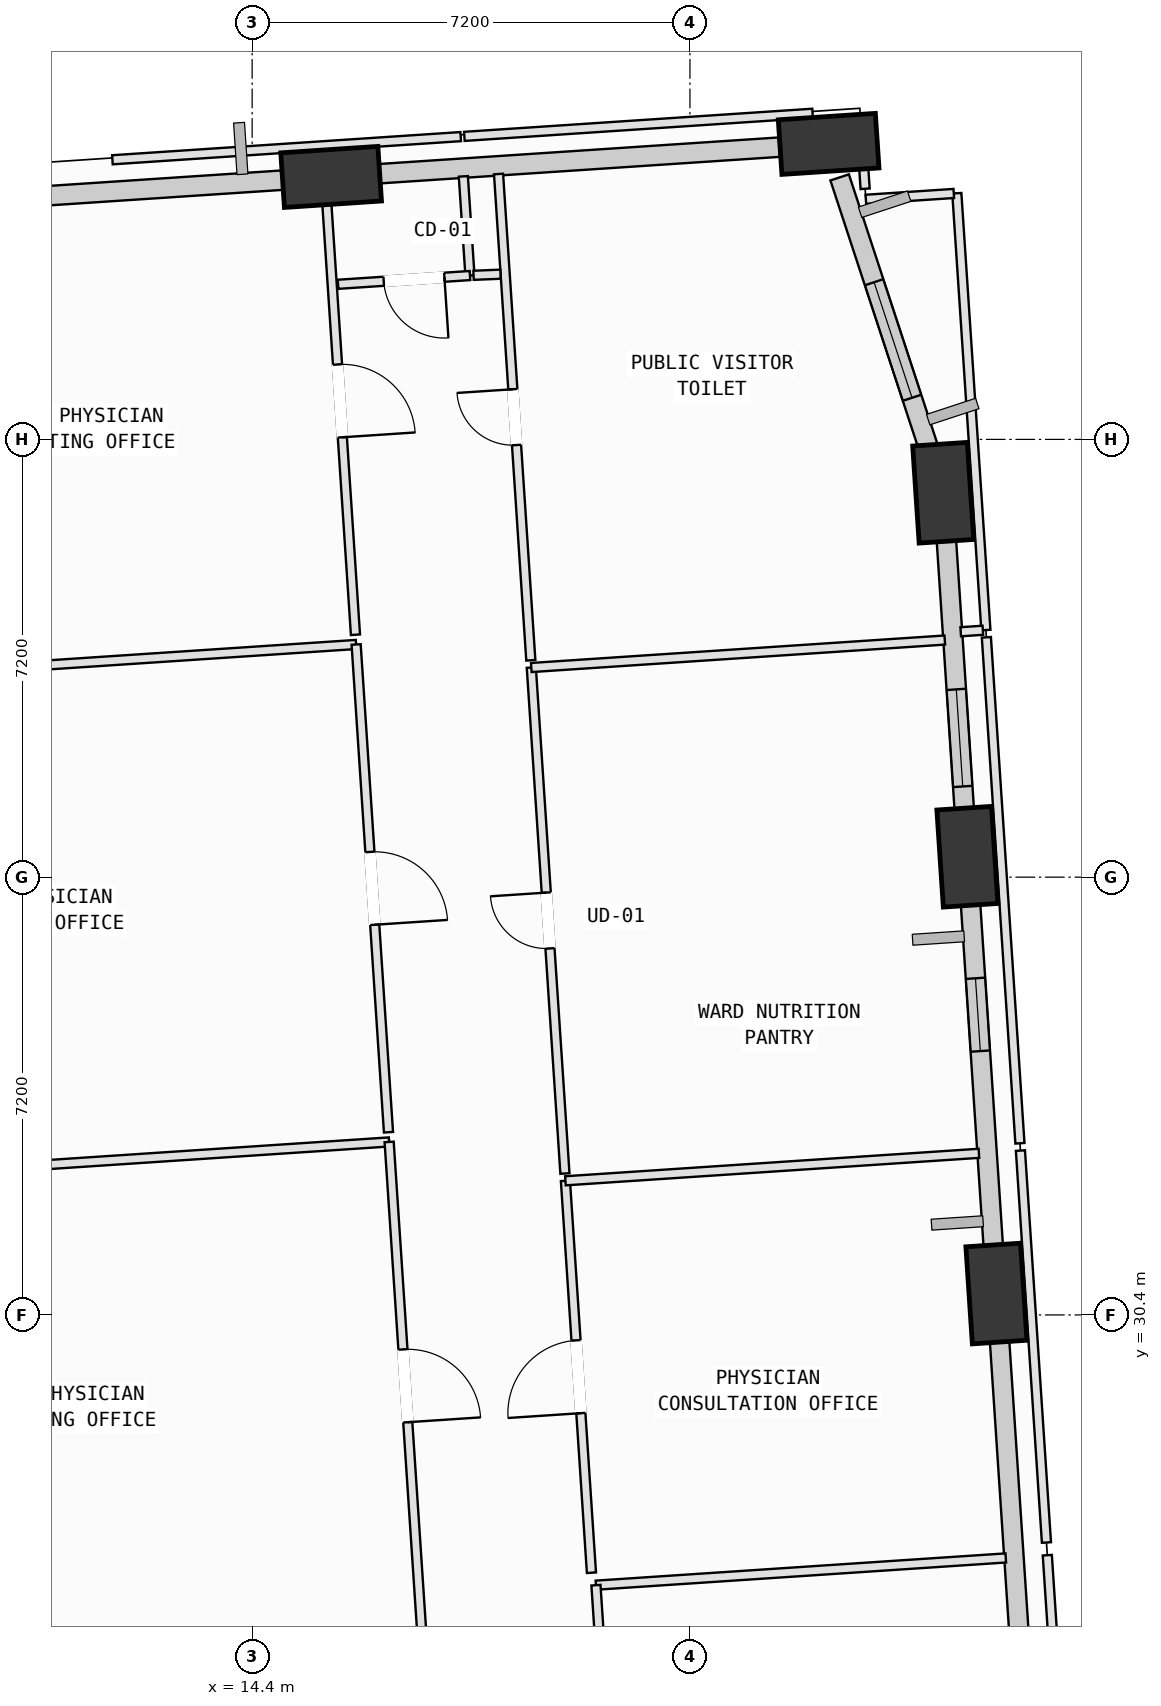
"""IFC4 building model, lengths in metres.
Left out: names, types, materials, properties, quantities, classifications, styles, units other than length and angle.
Written with IfcOpenShell. Run it as: python <this file> out.ifc"""

import sys

from ifc_helpers import new_model, si_unit, direction, frame, frame_2d, origin, origin_2d, place, context, subcontext, project, spatial, rectangle, extrude, element, fill, save


model = new_model("IFC4")
c1 = context("Model", 3, precision=1e-05, world=origin(), true_north=direction((0.0, 1.0)))
c2 = subcontext(c1, "Body", "Model", "MODEL_VIEW")
j1 = project(units=[si_unit("LENGTHUNIT", "METRE"), si_unit("PLANEANGLEUNIT", "RADIAN")], contexts=[c1])
p1 = place(None, origin())
s1 = spatial("IfcSite", under=j1, at=p1, CompositionType="ELEMENT")
p2 = place(p1, origin())
s2 = spatial("IfcBuilding", under=s1, at=p2, CompositionType="ELEMENT")
p3 = place(p2, frame((0.0, 0.0, 39.0)))
s3 = spatial("IfcBuildingStorey", under=s2, at=p3, CompositionType="ELEMENT", Elevation=39.0)
p4 = place(p3, frame((26.64, 30.752, 0.002), z_axis=(-0.024417379694, -0.028995638386, 0.999281263971), x_axis=(0.591563998635, 0.805370344302, 0.037823855406)))
e1 = element("IfcColumn", 1, at=p4, inside=s3, PredefinedType="COLUMN", context=c2, shape_type="SweptSolid", body=[
    extrude(rectangle(XDim=1.6, YDim=0.9, at=origin_2d()), origin(), (0.0, 0.0, 1.0), 4.0),
])
p5 = place(p3, frame((26.163, 37.936, 0.002), z_axis=(-0.054139539423, -0.031215590298, 0.998045338245), x_axis=(0.829617607898, 0.554838963776, 0.062356627078)))
e2 = element("IfcColumn", 2, at=p5, inside=s3, PredefinedType="COLUMN", context=c2, shape_type="SweptSolid", body=[
    extrude(rectangle(XDim=1.6, YDim=0.9, at=origin_2d()), origin(), (0.0, 0.0, 1.0), 4.004),
])
p6 = place(p3, frame((25.765, 43.923, 0.002), z_axis=(-0.078697694353, -0.033049379763, 0.996350546445), x_axis=(0.890951953445, 0.446039267367, 0.08516800232)))
e3 = element("IfcColumn", 3, at=p6, inside=s3, PredefinedType="COLUMN", context=c2, shape_type="SweptSolid", body=[
    extrude(rectangle(XDim=1.6, YDim=0.9, at=origin_2d()), origin(), (0.0, 0.0, 1.0), 4.011),
])
p7 = place(p3, frame((23.881, 49.66, 0.002), z_axis=(-0.102065358424, -0.040862573599, 0.993938082925), x_axis=(0.432012401952, -0.901838231222, 0.007286238123)))
e4 = element("IfcColumn", 4, at=p7, inside=s3, PredefinedType="COLUMN", context=c2, shape_type="SweptSolid", body=[
    extrude(rectangle(XDim=1.6, YDim=0.9, at=origin_2d()), origin(), (0.0, 0.0, 1.0), 4.021),
])
p8 = place(p3, frame((15.699, 49.117, 0.002), z_axis=(-0.099407727079, -0.074434566374, 0.992258836759), x_axis=(0.650696804167, -0.759293046403, 0.008230354175)))
e5 = element("IfcColumn", 5, at=p8, inside=s3, PredefinedType="COLUMN", context=c2, shape_type="SweptSolid", body=[
    extrude(rectangle(XDim=1.6, YDim=0.9, at=origin_2d()), origin(), (0.0, 0.0, 1.0), 4.028),
])
p9 = place(p3, frame((27.117, 23.571, 0.0), z_axis=(0.0, 0.0, 1.0), x_axis=(-0.066263654845, 0.997802148748, 0.0)))
e6 = element("IfcWall", 6, at=p9, inside=s3, PredefinedType="SOLIDWALL", context=c2, shape_type="SweptSolid", body=[
    extrude(rectangle(XDim=6.536, YDim=0.32, at=frame_2d((3.268, 0.0))), origin(), (0.0, 0.0, 1.0), 3.165),
])
p10 = place(p3, frame((26.604, 31.302, 0.0), z_axis=(0.0, 0.0, 1.0), x_axis=(-0.066281214276, 0.997800982478, 0.0)))
e7 = element("IfcWall", 7, at=p10, inside=s3, PredefinedType="SOLIDWALL", context=c2, shape_type="SweptSolid", body=[
    extrude(rectangle(XDim=5.997, YDim=0.32, at=frame_2d((2.998, 0.0))), origin(), (0.0, 0.0, 1.0), 3.165),
])
p11 = place(p10, frame((3.446, 0.0, 0.75)))
e8 = element("IfcOpeningElement", 8, at=p11, cuts=e7, PredefinedType="OPENING", context=c2, shape_type="SweptSolid", body=[
    extrude(rectangle(XDim=1.2, YDim=1.75, at=frame_2d((0.6, 0.875))), frame((0.0, 0.17, 0.0), z_axis=(0.0, -1.0, 0.0), x_axis=(1.0, 0.0, 0.0)), (0.0, 0.0, 1.0), 0.34),
])
p12 = place(p3, frame((26.127, 38.477, 0.0), z_axis=(0.0, 0.0, 1.0), x_axis=(-0.066303684838, 0.997799489565, 0.0)))
e9 = element("IfcWall", 9, at=p12, inside=s3, PredefinedType="SOLIDWALL", context=c2, shape_type="SweptSolid", body=[
    extrude(rectangle(XDim=4.816, YDim=0.32, at=frame_2d((2.408, 0.0))), origin(), (0.0, 0.0, 1.0), 3.165),
])
p13 = place(p12, frame((0.616, 0.0, 0.75)))
e10 = element("IfcOpeningElement", 10, at=p13, cuts=e9, PredefinedType="OPENING", context=c2, shape_type="SweptSolid", body=[
    extrude(rectangle(XDim=1.6, YDim=1.95, at=frame_2d((0.8, 0.975))), frame((0.0, 0.17, 0.0), z_axis=(0.0, -1.0, 0.0), x_axis=(1.0, 0.0, 0.0)), (0.0, 0.0, 1.0), 0.34),
])
p14 = place(p3, frame((24.062, 49.109, 0.0), z_axis=(0.0, 0.0, 1.0), x_axis=(0.312045120055, -0.950067283433, 0.0)))
e11 = element("IfcWall", 11, at=p14, inside=s3, PredefinedType="SOLIDWALL", context=c2, shape_type="SweptSolid", body=[
    extrude(rectangle(XDim=4.889, YDim=0.32, at=frame_2d((2.445, 0.0))), origin(), (0.0, 0.0, 1.0), 3.165),
])
p15 = place(p14, frame((1.815, 0.0, 0.75)))
e12 = element("IfcOpeningElement", 12, at=p15, cuts=e11, PredefinedType="OPENING", context=c2, shape_type="SweptSolid", body=[
    extrude(rectangle(XDim=2.0, YDim=1.95, at=frame_2d((1.0, 0.975))), frame((0.0, 0.17, 0.0), z_axis=(0.0, -1.0, 0.0), x_axis=(1.0, 0.0, 0.0)), (0.0, 0.0, 1.0), 0.34),
])
p16 = place(p3, frame((16.081, 49.142, 0.0), z_axis=(0.0, 0.0, 1.0), x_axis=(0.997799173188, 0.066308445806, 0.0)))
e13 = element("IfcWall", 13, at=p16, inside=s3, PredefinedType="SOLIDWALL", context=c2, shape_type="SweptSolid", body=[
    extrude(rectangle(XDim=7.003, YDim=0.32, at=frame_2d((3.501, 0.0))), origin(), (0.0, 0.0, 1.0), 3.165),
])
p17 = place(p3, frame((7.879, 48.598, 0.0), z_axis=(0.0, 0.0, 1.0), x_axis=(0.997800640447, 0.066286363022, 0.0)))
e14 = element("IfcWall", 14, at=p17, inside=s3, PredefinedType="SOLIDWALL", context=c2, shape_type="SweptSolid", body=[
    extrude(rectangle(XDim=7.035, YDim=0.32, at=frame_2d((3.517, 0.0))), origin(), (0.0, 0.0, 1.0), 3.165),
])
p18 = place(p3, frame((5.712, 32.519, 0.0), z_axis=(0.0, 0.0, 1.0), x_axis=(0.997805307983, 0.066216065736, 0.0)))
e15 = element("IfcWall", 15, at=p18, inside=s3, PredefinedType="PARTITIONING", context=c2, shape_type="SweptSolid", body=[
    extrude(rectangle(XDim=10.965, YDim=0.15, at=frame_2d((5.483, 0.0))), origin(), (0.0, 0.0, 1.0), 3.365),
])
p19 = place(p3, frame((16.653, 33.245, 0.0), z_axis=(0.0, 0.0, 1.0), x_axis=(0.066289247384, -0.997800448828, 0.0)))
e16 = element("IfcWall", 16, at=p19, inside=s3, PredefinedType="PARTITIONING", context=c2, shape_type="SweptSolid", body=[
    extrude(rectangle(XDim=8.04, YDim=0.15, at=frame_2d((4.02, 0.0))), origin(), (0.0, 0.0, 1.0), 3.78),
])
p20 = place(p19, frame((3.42, 0.0, 0.0)))
e17 = element("IfcOpeningElement", 17, at=p20, cuts=e16, PredefinedType="OPENING", context=c2, shape_type="SweptSolid", body=[
    extrude(rectangle(XDim=1.2, YDim=2.15, at=frame_2d((0.6, 1.075))), frame((0.0, 0.085, 0.0), z_axis=(0.0, -1.0, 0.0), x_axis=(1.0, 0.0, 0.0)), (0.0, 0.0, 1.0), 0.17),
])
p21 = place(p3, frame((5.169, 40.701, 0.0), z_axis=(0.0, 0.0, 1.0), x_axis=(0.997805307983, 0.066216065736, 0.0)))
e18 = element("IfcWall", 18, at=p21, inside=s3, PredefinedType="PARTITIONING", context=c2, shape_type="SweptSolid", body=[
    extrude(rectangle(XDim=10.965, YDim=0.15, at=frame_2d((5.483, 0.0))), origin(), (0.0, 0.0, 1.0), 3.78),
])
p22 = place(p3, frame((16.11, 41.427, 0.0), z_axis=(0.0, 0.0, 1.0), x_axis=(0.066170320126, -0.997808342686, 0.0)))
e19 = element("IfcWall", 19, at=p22, inside=s3, PredefinedType="PARTITIONING", context=c2, shape_type="SweptSolid", body=[
    extrude(rectangle(XDim=8.04, YDim=0.15, at=frame_2d((4.02, 0.0))), origin(), (0.0, 0.0, 1.0), 3.78),
])
p23 = place(p22, frame((3.42, 0.0, 0.0)))
e20 = element("IfcOpeningElement", 20, at=p23, cuts=e19, PredefinedType="OPENING", context=c2, shape_type="SweptSolid", body=[
    extrude(rectangle(XDim=1.2, YDim=2.15, at=frame_2d((0.6, 1.075))), frame((0.0, 0.085, 0.0), z_axis=(0.0, -1.0, 0.0), x_axis=(1.0, 0.0, 0.0)), (0.0, 0.0, 1.0), 0.17),
])
p24 = place(p3, frame((14.887, 49.233, 0.0), z_axis=(0.0, 0.0, 1.0), x_axis=(0.997748098839, 0.067072582054, 0.0)))
e21 = element("IfcWall", 21, at=p24, inside=s3, PredefinedType="PARTITIONING", context=c2, shape_type="SweptSolid", body=[
    extrude(rectangle(XDim=0.702, YDim=0.15, at=frame_2d((0.351, 0.0))), origin(), (0.0, 0.0, 1.0), 3.78),
])
p25 = place(p3, frame((15.588, 49.28, 0.0), z_axis=(0.0, 0.0, 1.0), x_axis=(0.066306740692, -0.997799286499, 0.0)))
e22 = element("IfcWall", 22, at=p25, inside=s3, PredefinedType="PARTITIONING", context=c2, shape_type="SweptSolid", body=[
    extrude(rectangle(XDim=7.71, YDim=0.15, at=frame_2d((3.855, 0.0))), origin(), (0.0, 0.0, 1.0), 2.865),
])
p26 = place(p25, frame((3.255, 0.0, 0.0)))
e23 = element("IfcOpeningElement", 23, at=p26, cuts=e22, PredefinedType="OPENING", context=c2, shape_type="SweptSolid", body=[
    extrude(rectangle(XDim=1.2, YDim=2.15, at=frame_2d((0.6, 1.075))), frame((0.0, 0.085, 0.0), z_axis=(0.0, -1.0, 0.0), x_axis=(1.0, 0.0, 0.0)), (0.0, 0.0, 1.0), 0.17),
])
p27 = place(p3, frame((20.054, 25.955, 0.0), z_axis=(0.0, 0.0, 1.0), x_axis=(0.997798252278, 0.066322302059, 0.0)))
e24 = element("IfcWall", 24, at=p27, inside=s3, PredefinedType="PARTITIONING", context=c2, shape_type="SweptSolid", body=[
    extrude(rectangle(XDim=6.755, YDim=0.15, at=frame_2d((3.377, 0.0))), origin(), (0.0, 0.0, 1.0), 3.78),
])
p28 = place(p3, frame((27.477, 26.448, 0.0), z_axis=(0.0, 0.0, 1.0), x_axis=(0.066297290222, -0.997799914466, 0.0)))
e25 = element("IfcWall", 25, at=p28, inside=s3, PredefinedType="PARTITIONING", context=c2, shape_type="SweptSolid", body=[
    extrude(rectangle(XDim=2.85, YDim=0.15, at=frame_2d((1.425, 0.0))), origin(), (0.0, 0.0, 1.0), 3.78),
])
p29 = place(p3, frame((20.411, 20.58, 0.0), z_axis=(0.0, 0.0, 1.0), x_axis=(-0.066260313675, 0.997802370628, 0.0)))
e26 = element("IfcWall", 26, at=p29, inside=s3, PredefinedType="PARTITIONING", context=c2, shape_type="SweptSolid", body=[
    extrude(rectangle(XDim=5.387, YDim=0.15, at=frame_2d((2.693, 0.0))), origin(), (0.0, 0.0, 1.0), 3.78),
])
p30 = place(p3, frame((19.98, 26.16, 0.0), z_axis=(0.0, 0.0, 1.0), x_axis=(-0.066248114822, 0.997803180634, 0.0)))
e27 = element("IfcWall", 27, at=p30, inside=s3, PredefinedType="PARTITIONING", context=c2, shape_type="SweptSolid", body=[
    extrude(rectangle(XDim=6.46, YDim=0.15, at=frame_2d((3.23, 0.0))), origin(), (0.0, 0.0, 1.0), 3.78),
])
p31 = place(p30, frame((2.63, 0.0, 0.0)))
e28 = element("IfcOpeningElement", 28, at=p31, cuts=e27, PredefinedType="OPENING", context=c2, shape_type="SweptSolid", body=[
    extrude(rectangle(XDim=1.2, YDim=2.15, at=frame_2d((0.6, 1.075))), frame((0.0, 0.085, 0.0), z_axis=(0.0, -1.0, 0.0), x_axis=(1.0, 0.0, 0.0)), (0.0, 0.0, 1.0), 0.17),
])
p32 = place(p3, frame((19.552, 32.606, 0.0), z_axis=(0.0, 0.0, 1.0), x_axis=(0.997796714123, 0.066345439075, 0.0)))
e29 = element("IfcWall", 29, at=p32, inside=s3, PredefinedType="PARTITIONING", context=c2, shape_type="SweptSolid", body=[
    extrude(rectangle(XDim=6.815, YDim=0.15, at=frame_2d((3.408, 0.0))), origin(), (0.0, 0.0, 1.0), 3.365),
])
p33 = place(p3, frame((27.035, 33.103, 0.0), z_axis=(0.0, 0.0, 1.0), x_axis=(0.066248114822, -0.997803180634, 0.0)))
e30 = element("IfcWall", 30, at=p33, inside=s3, PredefinedType="PARTITIONING", context=c2, shape_type="SweptSolid", body=[
    extrude(rectangle(XDim=6.46, YDim=0.15, at=frame_2d((3.23, 0.0))), origin(), (0.0, 0.0, 1.0), 3.78),
])
p34 = place(p3, frame((19.544, 32.726, 0.0), z_axis=(0.0, 0.0, 1.0), x_axis=(-0.066301410689, 0.99779964068, 0.0)))
e31 = element("IfcWall", 31, at=p34, inside=s3, PredefinedType="PARTITIONING", context=c2, shape_type="SweptSolid", body=[
    extrude(rectangle(XDim=8.34, YDim=0.15, at=frame_2d((4.17, 0.0))), origin(), (0.0, 0.0, 1.0), 3.78),
])
p35 = place(p34, frame((3.71, 0.0, 0.0)))
e32 = element("IfcOpeningElement", 32, at=p35, cuts=e31, PredefinedType="OPENING", context=c2, shape_type="SweptSolid", body=[
    extrude(rectangle(XDim=0.92, YDim=2.1, at=frame_2d((0.46, 1.05))), frame((0.0, 0.085, 0.0), z_axis=(0.0, -1.0, 0.0), x_axis=(1.0, 0.0, 0.0)), (0.0, 0.0, 1.0), 0.17),
])
p36 = place(p3, frame((18.991, 41.048, 0.0), z_axis=(0.0, 0.0, 1.0), x_axis=(0.997799084991, 0.066309772962, 0.0)))
e33 = element("IfcWall", 33, at=p36, inside=s3, PredefinedType="PARTITIONING", context=c2, shape_type="SweptSolid", body=[
    extrude(rectangle(XDim=6.815, YDim=0.15, at=frame_2d((3.407, 0.0))), origin(), (0.0, 0.0, 1.0), 3.78),
])
p37 = place(p3, frame((26.475, 41.545, 0.0), z_axis=(0.0, 0.0, 1.0), x_axis=(0.066184835455, -0.997807379987, 0.0)))
e34 = element("IfcWall", 34, at=p37, inside=s3, PredefinedType="PARTITIONING", context=c2, shape_type="SweptSolid", body=[
    extrude(rectangle(XDim=8.34, YDim=0.15, at=frame_2d((4.17, 0.0))), origin(), (0.0, 0.0, 1.0), 3.78),
])
p38 = place(p3, frame((25.989, 48.848, 0.0), z_axis=(0.0, 0.0, 1.0), x_axis=(0.066395224543, -0.997793402543, 0.0)))
e35 = element("IfcWall", 35, at=p38, inside=s3, PredefinedType="PARTITIONING", context=c2, shape_type="SweptSolid", body=[
    extrude(rectangle(XDim=7.2, YDim=0.15, at=frame_2d((3.6, 0.0))), origin(), (0.0, 0.0, 1.0), 3.78),
])
p39 = place(p3, frame((26.417, 41.661, 0.0), z_axis=(0.0, 0.0, 1.0), x_axis=(-0.99766818576, -0.068250942285, 0.0)))
e36 = element("IfcWall", 36, at=p39, inside=s3, PredefinedType="PARTITIONING", context=c2, shape_type="SweptSolid", body=[
    extrude(rectangle(XDim=0.365, YDim=0.15, at=frame_2d((0.182, 0.0))), origin(), (0.0, 0.0, 1.0), 3.78),
])
p40 = place(p3, frame((18.983, 41.167, 0.0), z_axis=(0.0, 0.0, 1.0), x_axis=(-0.066246099174, 0.997803314458, 0.0)))
e37 = element("IfcWall", 37, at=p40, inside=s3, PredefinedType="PARTITIONING", context=c2, shape_type="SweptSolid", body=[
    extrude(rectangle(XDim=8.016, YDim=0.15, at=frame_2d((4.008, 0.0))), origin(), (0.0, 0.0, 1.0), 3.78),
])
p41 = place(p40, frame((3.548, 0.0, 0.0)))
e38 = element("IfcOpeningElement", 38, at=p41, cuts=e37, PredefinedType="OPENING", context=c2, shape_type="SweptSolid", body=[
    extrude(rectangle(XDim=0.92, YDim=2.1, at=frame_2d((0.46, 1.05))), frame((0.0, 0.085, 0.0), z_axis=(0.0, -1.0, 0.0), x_axis=(1.0, 0.0, 0.0)), (0.0, 0.0, 1.0), 0.17),
])
p42 = place(p3, frame((23.056, 49.797, 0.0), z_axis=(0.0, 0.0, 1.0), x_axis=(0.997828501674, 0.065865630245, 0.0)))
e39 = element("IfcWall", 39, at=p42, inside=s3, PredefinedType="PARTITIONING", context=c2, shape_type="SweptSolid", body=[
    extrude(rectangle(XDim=1.364, YDim=0.15, at=frame_2d((0.682, 0.0))), origin(), (0.0, 0.0, 1.0), 3.165),
])
p43 = place(p3, frame((24.42, 49.837, 0.0), z_axis=(0.0, 0.0, 1.0), x_axis=(0.066572032403, -0.99778162165, 0.0)))
e40 = element("IfcWall", 40, at=p43, inside=s3, PredefinedType="PARTITIONING", context=c2, shape_type="SweptSolid", body=[
    extrude(rectangle(XDim=0.917, YDim=0.15, at=frame_2d((0.458, 0.0))), origin(), (0.0, 0.0, 1.0), 3.78),
])
p44 = place(p3, frame((24.493, 48.749, 0.0), z_axis=(0.0, 0.0, 1.0), x_axis=(0.997805980255, 0.066205934533, 0.0)))
e41 = element("IfcWall", 41, at=p44, inside=s3, PredefinedType="PARTITIONING", context=c2, shape_type="SweptSolid", body=[
    extrude(rectangle(XDim=1.449, YDim=0.15, at=frame_2d((0.725, 0.0))), origin(), (0.0, 0.0, 1.0), 3.78),
])
p45 = place(p3, frame((12.102, 49.399, 0.0), z_axis=(0.0, 0.0, 1.0), x_axis=(0.997793993374, 0.066386344883, 0.0)))
e42 = element("IfcWall", 42, at=p45, inside=s3, PredefinedType="PARTITIONING", context=c2, shape_type="SweptSolid", body=[
    extrude(rectangle(XDim=5.741, YDim=0.15, at=frame_2d((2.87, 0.0))), origin(), (0.0, 0.0, 1.0), 3.78),
])
p46 = place(p3, frame((17.873, 49.126, 0.0), z_axis=(0.0, 0.0, 1.0), x_axis=(0.066618148279, -0.997778543726, 0.0)))
e43 = element("IfcWall", 43, at=p46, inside=s3, PredefinedType="PARTITIONING", context=c2, shape_type="SweptSolid", body=[
    extrude(rectangle(XDim=1.635, YDim=0.15, at=frame_2d((0.817, 0.0))), origin(), (0.0, 0.0, 1.0), 3.78),
])
p47 = place(p3, frame((17.982, 47.495, 0.0), z_axis=(0.0, 0.0, 1.0), x_axis=(-0.997802022538, -0.066265555301, 0.0)))
e44 = element("IfcWall", 44, at=p47, inside=s3, PredefinedType="PARTITIONING", context=c2, shape_type="SweptSolid", body=[
    extrude(rectangle(XDim=2.174, YDim=0.15, at=frame_2d((1.087, 0.0))), origin(), (0.0, 0.0, 1.0), 3.78),
])
p48 = place(p47, frame((0.421, 0.0, 0.0)))
e45 = element("IfcOpeningElement", 45, at=p48, cuts=e44, PredefinedType="OPENING", context=c2, shape_type="SweptSolid", body=[
    extrude(rectangle(XDim=1.0, YDim=2.12, at=frame_2d((0.5, 1.06))), frame((0.0, 0.085, 0.0), z_axis=(0.0, -1.0, 0.0), x_axis=(1.0, 0.0, 0.0)), (0.0, 0.0, 1.0), 0.17),
])
p49 = place(p3, frame((18.484, 47.517, 0.0), z_axis=(0.0, 0.0, 1.0), x_axis=(-0.999168968956, -0.040759924864, 0.0)))
e46 = element("IfcWall", 46, at=p49, inside=s3, PredefinedType="PARTITIONING", context=c2, shape_type="SweptSolid", body=[
    extrude(rectangle(XDim=0.443, YDim=0.15, at=frame_2d((0.222, 0.0))), origin(), (0.0, 0.0, 1.0), 3.78),
])
p50 = place(p3, frame((17.89, 49.784, 0.0), z_axis=(0.0, 0.0, 1.0), x_axis=(0.997804501264, 0.066228221011, 0.0)))
e47 = element("IfcWall", 47, at=p50, inside=s3, PredefinedType="PARTITIONING", context=c2, shape_type="SweptSolid", body=[
    extrude(rectangle(XDim=5.74, YDim=0.15, at=frame_2d((2.87, 0.0))), origin(), (0.0, 0.0, 1.0), 3.78),
])
p51 = place(p11, origin())
e48 = element("IfcWindow", 48, at=p51, inside=s3, PartitioningType="SINGLE_PANEL", PredefinedType="WINDOW", context=c2, shape_type="SweptSolid", body=[
    extrude(rectangle(XDim=1.2, YDim=1.75, at=frame_2d((0.6, 0.875))), frame((0.0, 0.03, 0.0), z_axis=(0.0, -1.0, 0.0), x_axis=(1.0, 0.0, 0.0)), (0.0, 0.0, 1.0), 0.06),
])
fill(e8, e48)
p52 = place(p13, origin())
e49 = element("IfcWindow", 49, at=p52, inside=s3, PartitioningType="SINGLE_PANEL", PredefinedType="WINDOW", context=c2, shape_type="SweptSolid", body=[
    extrude(rectangle(XDim=1.6, YDim=1.95, at=frame_2d((0.8, 0.975))), frame((0.0, 0.03, 0.0), z_axis=(0.0, -1.0, 0.0), x_axis=(1.0, 0.0, 0.0)), (0.0, 0.0, 1.0), 0.06),
])
fill(e10, e49)
p53 = place(p15, origin())
e50 = element("IfcWindow", 50, at=p53, inside=s3, PartitioningType="SINGLE_PANEL", PredefinedType="WINDOW", context=c2, shape_type="SweptSolid", body=[
    extrude(rectangle(XDim=2.0, YDim=1.95, at=frame_2d((1.0, 0.975))), frame((0.0, 0.03, 0.0), z_axis=(0.0, -1.0, 0.0), x_axis=(1.0, 0.0, 0.0)), (0.0, 0.0, 1.0), 0.06),
])
fill(e12, e50)
p54 = place(p20, origin())
e51 = element("IfcDoor", 51, at=p54, inside=s3, OperationType="SINGLE_SWING_RIGHT", PredefinedType="DOOR", context=c2, shape_type="SweptSolid", body=[
    extrude(rectangle(XDim=1.2, YDim=2.15, at=frame_2d((0.6, 1.075))), frame((0.0, 0.025, 0.0), z_axis=(0.0, -1.0, 0.0), x_axis=(1.0, 0.0, 0.0)), (0.0, 0.0, 1.0), 0.05),
])
fill(e17, e51)
p55 = place(p23, origin())
e52 = element("IfcDoor", 52, at=p55, inside=s3, OperationType="SINGLE_SWING_RIGHT", PredefinedType="DOOR", context=c2, shape_type="SweptSolid", body=[
    extrude(rectangle(XDim=1.2, YDim=2.15, at=frame_2d((0.6, 1.075))), frame((0.0, 0.025, 0.0), z_axis=(0.0, -1.0, 0.0), x_axis=(1.0, 0.0, 0.0)), (0.0, 0.0, 1.0), 0.05),
])
fill(e20, e52)
p56 = place(p26, origin())
e53 = element("IfcDoor", 53, at=p56, inside=s3, OperationType="SINGLE_SWING_RIGHT", PredefinedType="DOOR", context=c2, shape_type="SweptSolid", body=[
    extrude(rectangle(XDim=1.2, YDim=2.15, at=frame_2d((0.6, 1.075))), frame((0.0, 0.025, 0.0), z_axis=(0.0, -1.0, 0.0), x_axis=(1.0, 0.0, 0.0)), (0.0, 0.0, 1.0), 0.05),
])
fill(e23, e53)
p57 = place(p31, origin())
e54 = element("IfcDoor", 54, at=p57, inside=s3, OperationType="SINGLE_SWING_LEFT", PredefinedType="DOOR", context=c2, shape_type="SweptSolid", body=[
    extrude(rectangle(XDim=1.2, YDim=2.15, at=frame_2d((0.6, 1.075))), frame((0.0, 0.025, 0.0), z_axis=(0.0, -1.0, 0.0), x_axis=(1.0, 0.0, 0.0)), (0.0, 0.0, 1.0), 0.05),
])
fill(e28, e54)
p58 = place(p35, origin())
e55 = element("IfcDoor", 55, at=p58, inside=s3, OperationType="SINGLE_SWING_RIGHT", PredefinedType="DOOR", context=c2, shape_type="SweptSolid", body=[
    extrude(rectangle(XDim=0.92, YDim=2.1, at=frame_2d((0.46, 1.05))), frame((0.0, 0.025, 0.0), z_axis=(0.0, -1.0, 0.0), x_axis=(1.0, 0.0, 0.0)), (0.0, 0.0, 1.0), 0.05),
])
fill(e32, e55)
p59 = place(p41, origin())
e56 = element("IfcDoor", 56, at=p59, inside=s3, OperationType="SINGLE_SWING_RIGHT", PredefinedType="DOOR", context=c2, shape_type="SweptSolid", body=[
    extrude(rectangle(XDim=0.92, YDim=2.1, at=frame_2d((0.46, 1.05))), frame((0.0, 0.025, 0.0), z_axis=(0.0, -1.0, 0.0), x_axis=(1.0, 0.0, 0.0)), (0.0, 0.0, 1.0), 0.05),
])
fill(e38, e56)
p60 = place(p48, origin())
e57 = element("IfcDoor", 57, at=p60, inside=s3, OperationType="SINGLE_SWING_LEFT", PredefinedType="DOOR", context=c2, shape_type="SweptSolid", body=[
    extrude(rectangle(XDim=1.0, YDim=2.12, at=frame_2d((0.5, 1.06))), frame((0.0, 0.025, 0.0), z_axis=(0.0, -1.0, 0.0), x_axis=(1.0, 0.0, 0.0)), (0.0, 0.0, 1.0), 0.05),
])
fill(e45, e57)
save(model, sys.argv[1])
